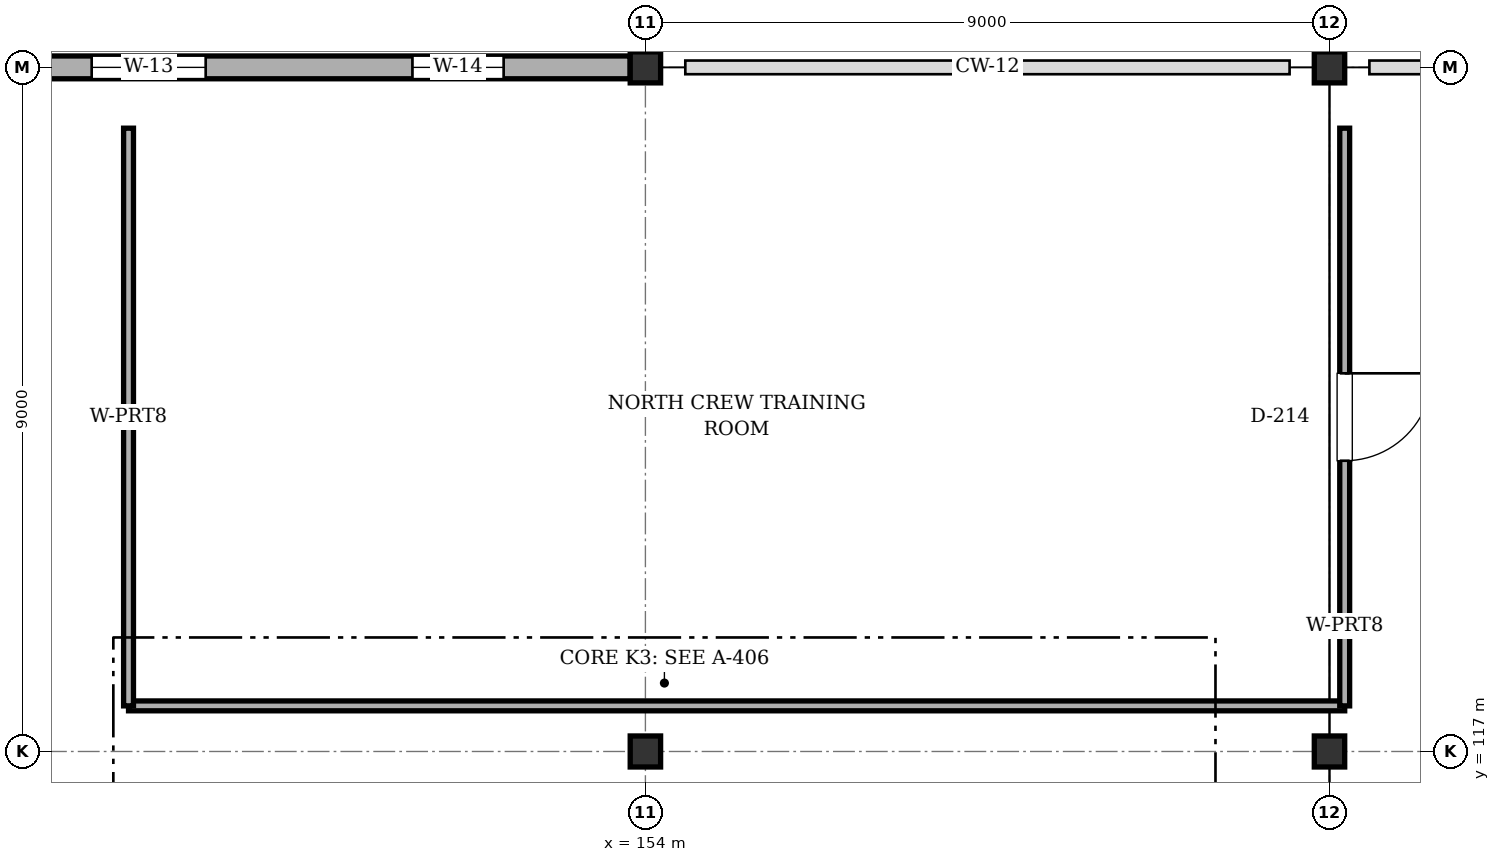
"""IFC4 building model, lengths in metres.
Left out: names, types, materials, properties, quantities, classifications, styles, units other than length and angle.
Written with IfcOpenShell. Run it as: python <this file> out.ifc"""

import sys

from ifc_helpers import new_model, si_unit, direction, frame, frame_2d, origin, origin_2d, place, context, subcontext, project, spatial, rectangle, i_section, extrude, element, fill, save


model = new_model("IFC4")
c1 = context("Model", 3, precision=1e-05, world=origin(), true_north=direction((0.0, 1.0)))
c2 = subcontext(c1, "Body", "Model", "MODEL_VIEW")
j1 = project(units=[si_unit("LENGTHUNIT", "METRE"), si_unit("PLANEANGLEUNIT", "RADIAN")], contexts=[c1])
p1 = place(None, origin())
s1 = spatial("IfcSite", under=j1, at=p1, CompositionType="ELEMENT")
p2 = place(p1, origin())
s2 = spatial("IfcBuilding", under=s1, at=p2, CompositionType="ELEMENT")
p3 = place(p2, frame((0.0, 0.0, 10.8)))
s3 = spatial("IfcBuildingStorey", under=s2, at=p3, CompositionType="ELEMENT", Elevation=10.8)
for number, where, z_axis, x_axis in (
    (1, (154.0, 117.0, 0.0), (0.0, 0.0, 1.0), (1.0, 0.0, 0.0)),
    (2, (154.0, 126.0, 0.0), (0.0, 0.0, 1.0), (1.0, 0.0, 0.0)),
    (3, (163.0, 117.0, 0.0), (0.0, 0.0, 1.0), (1.0, 0.0, 0.0)),
    (4, (163.0, 126.0, 0.0), (0.0, 0.0, 1.0), (1.0, 0.0, 0.0)),
):
    element("IfcColumn", number, at=place(p3, frame(where, z_axis=z_axis, x_axis=x_axis)), inside=s3, PredefinedType="COLUMN", context=c2, shape_type="SweptSolid", body=[
        extrude(i_section(OverallWidth=0.4, OverallDepth=0.408, WebThickness=0.021, FlangeThickness=0.021, FilletRadius=0.022, at=origin_2d()), origin(), (0.0, 0.0, 1.0), 3.6),
    ])
p4 = place(p3, frame((145.2, 126.0, 0.0), z_axis=(0.0, 0.0, 1.0), x_axis=(1.0, 0.0, 0.0)))
e5 = element("IfcWall", 5, at=p4, inside=s3, PredefinedType="SOLIDWALL", context=c2, shape_type="SweptSolid", body=[
    extrude(rectangle(XDim=8.6, YDim=0.3, at=frame_2d((4.3, 0.0))), origin(), (0.0, 0.0, 1.0), 2.895),
])
p5 = place(p4, frame((1.515, 0.0, 0.9)))
e6 = element("IfcOpeningElement", 6, at=p5, cuts=e5, PredefinedType="OPENING", context=c2, shape_type="SweptSolid", body=[
    extrude(rectangle(XDim=1.5, YDim=1.5, at=frame_2d((0.75, 0.75))), frame((0.0, 0.16, 0.0), z_axis=(0.0, -1.0, 0.0), x_axis=(1.0, 0.0, 0.0)), (0.0, 0.0, 1.0), 0.32),
])
p6 = place(p4, frame((5.735, 0.0, 0.9)))
e7 = element("IfcOpeningElement", 7, at=p6, cuts=e5, PredefinedType="OPENING", context=c2, shape_type="SweptSolid", body=[
    extrude(rectangle(XDim=1.2, YDim=1.4, at=frame_2d((0.6, 0.7))), frame((0.0, 0.16, 0.0), z_axis=(0.0, -1.0, 0.0), x_axis=(1.0, 0.0, 0.0)), (0.0, 0.0, 1.0), 0.32),
])
p7 = place(p3, frame((163.2, 117.6, 0.0), z_axis=(0.0, 0.0, 1.0), x_axis=(-1.0, 0.0, 0.0)))
e8 = element("IfcWall", 8, at=p7, inside=s3, PredefinedType="PARTITIONING", context=c2, shape_type="SweptSolid", body=[
    extrude(rectangle(XDim=16.0, YDim=0.13, at=frame_2d((8.0, 0.0))), origin(), (0.0, 0.0, 1.0), 2.755),
])
p8 = place(p3, frame((147.2, 117.6, 0.0), z_axis=(0.0, 0.0, 1.0), x_axis=(0.0, 1.0, 0.0)))
e9 = element("IfcWall", 9, at=p8, inside=s3, PredefinedType="PARTITIONING", context=c2, shape_type="SweptSolid", body=[
    extrude(rectangle(XDim=7.6, YDim=0.13, at=frame_2d((3.8, 0.0))), origin(), (0.0, 0.0, 1.0), 2.895),
])
p9 = place(p3, frame((163.2, 125.2, 0.0), z_axis=(0.0, 0.0, 1.0), x_axis=(0.0, -1.0, 0.0)))
e10 = element("IfcWall", 10, at=p9, inside=s3, PredefinedType="PARTITIONING", context=c2, shape_type="SweptSolid", body=[
    extrude(rectangle(XDim=7.6, YDim=0.13, at=frame_2d((3.8, 0.0))), origin(), (0.0, 0.0, 1.0), 2.755),
])
p10 = place(p9, frame((3.225, 0.0, 0.0)))
e11 = element("IfcOpeningElement", 11, at=p10, cuts=e10, PredefinedType="OPENING", context=c2, shape_type="SweptSolid", body=[
    extrude(rectangle(XDim=1.15, YDim=2.1, at=frame_2d((0.575, 1.05))), frame((0.0, 0.075, 0.0), z_axis=(0.0, -1.0, 0.0), x_axis=(1.0, 0.0, 0.0)), (0.0, 0.0, 1.0), 0.15),
])
p11 = place(p5, origin())
e12 = element("IfcWindow", 12, at=p11, inside=s3, PartitioningType="SINGLE_PANEL", PredefinedType="WINDOW", context=c2, shape_type="SweptSolid", body=[
    extrude(rectangle(XDim=1.5, YDim=1.5, at=frame_2d((0.75, 0.75))), frame((0.0, 0.03, 0.0), z_axis=(0.0, -1.0, 0.0), x_axis=(1.0, 0.0, 0.0)), (0.0, 0.0, 1.0), 0.06),
])
fill(e6, e12)
p12 = place(p6, origin())
e13 = element("IfcWindow", 13, at=p12, inside=s3, PartitioningType="SINGLE_PANEL", PredefinedType="WINDOW", context=c2, shape_type="SweptSolid", body=[
    extrude(rectangle(XDim=1.2, YDim=1.4, at=frame_2d((0.6, 0.7))), frame((0.0, 0.03, 0.0), z_axis=(0.0, -1.0, 0.0), x_axis=(1.0, 0.0, 0.0)), (0.0, 0.0, 1.0), 0.06),
])
fill(e7, e13)
p13 = place(p10, origin())
e14 = element("IfcDoor", 14, at=p13, inside=s3, OperationType="SINGLE_SWING_LEFT", PredefinedType="DOOR", context=c2, shape_type="SweptSolid", body=[
    extrude(rectangle(XDim=1.15, YDim=2.1, at=frame_2d((0.575, 1.05))), frame((0.0, 0.025, 0.0), z_axis=(0.0, -1.0, 0.0), x_axis=(1.0, 0.0, 0.0)), (0.0, 0.0, 1.0), 0.05),
])
fill(e11, e14)
save(model, sys.argv[1])
